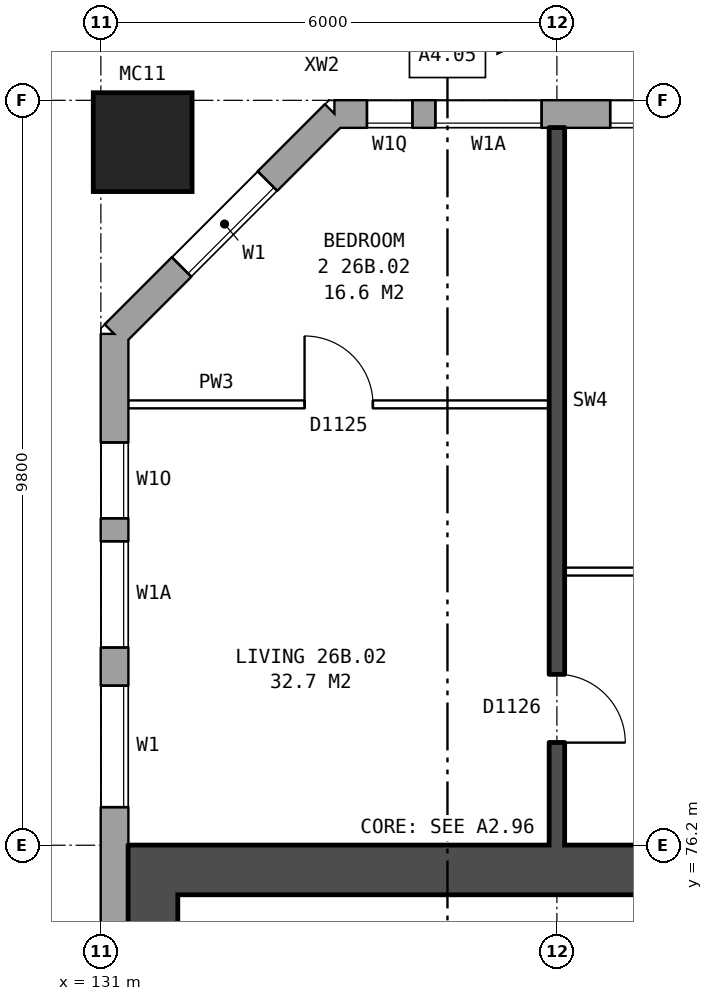
"""IFC4 building model, lengths in metres.
Left out: names, types, materials, properties, quantities, classifications, styles, units other than length and angle.
Written with IfcOpenShell. Run it as: python <this file> out.ifc"""

import sys

from ifc_helpers import new_model, si_unit, direction, frame, frame_2d, origin, origin_2d, place, context, subcontext, project, spatial, rectangle, hollow_rectangle, extrude, element, fill, save


model = new_model("IFC4")
c1 = context("Model", 3, precision=1e-05, world=origin(), true_north=direction((0.0, 1.0)))
c2 = subcontext(c1, "Body", "Model", "MODEL_VIEW")
j1 = project(units=[si_unit("LENGTHUNIT", "METRE"), si_unit("PLANEANGLEUNIT", "RADIAN")], contexts=[c1])
p1 = place(None, origin())
s1 = spatial("IfcSite", under=j1, at=p1, CompositionType="ELEMENT")
p2 = place(p1, origin())
s2 = spatial("IfcBuilding", under=s1, at=p2, CompositionType="ELEMENT")
p3 = place(p2, frame((0.0, 0.0, 96.4)))
s3 = spatial("IfcBuildingStorey", under=s2, at=p3, CompositionType="ELEMENT", Elevation=96.4)
p4 = place(p3, frame((131.55, 85.45, 0.0), z_axis=(0.0, 0.0, 1.0), x_axis=(1.0, 0.0, 0.0)))
e1 = element("IfcColumn", 1, at=p4, inside=s3, PredefinedType="COLUMN", context=c2, shape_type="SweptSolid", body=[
    extrude(hollow_rectangle(XDim=1.3, YDim=1.3, WallThickness=0.07, at=origin_2d()), origin(), (0.0, 0.0, 1.0), 3.1),
])
p5 = place(p3, frame((170.925, 85.82, 0.0), z_axis=(0.0, 0.0, 1.0), x_axis=(-1.0, 0.0, 0.0)))
e2 = element("IfcWall", 2, at=p5, inside=s3, PredefinedType="STANDARD", context=c2, shape_type="SweptSolid", body=[
    extrude(rectangle(XDim=36.851, YDim=0.36, at=frame_2d((18.425, 0.0))), origin(), (0.0, 0.0, 1.0), 2.85),
])
p6 = place(p5, frame((1.625, 0.0, 0.8)))
e3 = element("IfcOpeningElement", 3, at=p6, cuts=e2, PredefinedType="OPENING", context=c2, shape_type="SweptSolid", body=[
    extrude(rectangle(XDim=1.6, YDim=1.8, at=frame_2d((0.8, 0.9))), frame((0.0, 0.19, 0.0), z_axis=(0.0, -1.0, 0.0), x_axis=(1.0, 0.0, 0.0)), (0.0, 0.0, 1.0), 0.38),
])
p7 = place(p5, frame((4.625, 0.0, 0.8)))
e4 = element("IfcOpeningElement", 4, at=p7, cuts=e2, PredefinedType="OPENING", context=c2, shape_type="SweptSolid", body=[
    extrude(rectangle(XDim=1.6, YDim=1.8, at=frame_2d((0.8, 0.9))), frame((0.0, 0.19, 0.0), z_axis=(0.0, -1.0, 0.0), x_axis=(1.0, 0.0, 0.0)), (0.0, 0.0, 1.0), 0.38),
])
p8 = place(p5, frame((7.625, 0.0, 0.8)))
e5 = element("IfcOpeningElement", 5, at=p8, cuts=e2, PredefinedType="OPENING", context=c2, shape_type="SweptSolid", body=[
    extrude(rectangle(XDim=1.6, YDim=1.8, at=frame_2d((0.8, 0.9))), frame((0.0, 0.19, 0.0), z_axis=(0.0, -1.0, 0.0), x_axis=(1.0, 0.0, 0.0)), (0.0, 0.0, 1.0), 0.38),
])
p9 = place(p5, frame((10.625, 0.0, 0.8)))
e6 = element("IfcOpeningElement", 6, at=p9, cuts=e2, PredefinedType="OPENING", context=c2, shape_type="SweptSolid", body=[
    extrude(rectangle(XDim=1.6, YDim=1.8, at=frame_2d((0.8, 0.9))), frame((0.0, 0.19, 0.0), z_axis=(0.0, -1.0, 0.0), x_axis=(1.0, 0.0, 0.0)), (0.0, 0.0, 1.0), 0.38),
])
p10 = place(p5, frame((13.625, 0.0, 0.8)))
e7 = element("IfcOpeningElement", 7, at=p10, cuts=e2, PredefinedType="OPENING", context=c2, shape_type="SweptSolid", body=[
    extrude(rectangle(XDim=1.6, YDim=1.8, at=frame_2d((0.8, 0.9))), frame((0.0, 0.19, 0.0), z_axis=(0.0, -1.0, 0.0), x_axis=(1.0, 0.0, 0.0)), (0.0, 0.0, 1.0), 0.38),
])
p11 = place(p5, frame((16.625, 0.0, 0.8)))
e8 = element("IfcOpeningElement", 8, at=p11, cuts=e2, PredefinedType="OPENING", context=c2, shape_type="SweptSolid", body=[
    extrude(rectangle(XDim=1.6, YDim=1.8, at=frame_2d((0.8, 0.9))), frame((0.0, 0.19, 0.0), z_axis=(0.0, -1.0, 0.0), x_axis=(1.0, 0.0, 0.0)), (0.0, 0.0, 1.0), 0.38),
])
p12 = place(p5, frame((19.625, 0.0, 0.8)))
e9 = element("IfcOpeningElement", 9, at=p12, cuts=e2, PredefinedType="OPENING", context=c2, shape_type="SweptSolid", body=[
    extrude(rectangle(XDim=1.6, YDim=1.8, at=frame_2d((0.8, 0.9))), frame((0.0, 0.19, 0.0), z_axis=(0.0, -1.0, 0.0), x_axis=(1.0, 0.0, 0.0)), (0.0, 0.0, 1.0), 0.38),
])
p13 = place(p5, frame((22.625, 0.0, 0.8)))
e10 = element("IfcOpeningElement", 10, at=p13, cuts=e2, PredefinedType="OPENING", context=c2, shape_type="SweptSolid", body=[
    extrude(rectangle(XDim=1.6, YDim=1.8, at=frame_2d((0.8, 0.9))), frame((0.0, 0.19, 0.0), z_axis=(0.0, -1.0, 0.0), x_axis=(1.0, 0.0, 0.0)), (0.0, 0.0, 1.0), 0.38),
])
p14 = place(p5, frame((25.625, 0.0, 0.8)))
e11 = element("IfcOpeningElement", 11, at=p14, cuts=e2, PredefinedType="OPENING", context=c2, shape_type="SweptSolid", body=[
    extrude(rectangle(XDim=1.6, YDim=1.8, at=frame_2d((0.8, 0.9))), frame((0.0, 0.19, 0.0), z_axis=(0.0, -1.0, 0.0), x_axis=(1.0, 0.0, 0.0)), (0.0, 0.0, 1.0), 0.38),
])
p15 = place(p5, frame((28.625, 0.0, 0.8)))
e12 = element("IfcOpeningElement", 12, at=p15, cuts=e2, PredefinedType="OPENING", context=c2, shape_type="SweptSolid", body=[
    extrude(rectangle(XDim=1.6, YDim=1.8, at=frame_2d((0.8, 0.9))), frame((0.0, 0.19, 0.0), z_axis=(0.0, -1.0, 0.0), x_axis=(1.0, 0.0, 0.0)), (0.0, 0.0, 1.0), 0.38),
])
p16 = place(p5, frame((31.625, 0.0, 0.8)))
e13 = element("IfcOpeningElement", 13, at=p16, cuts=e2, PredefinedType="OPENING", context=c2, shape_type="SweptSolid", body=[
    extrude(rectangle(XDim=1.6, YDim=1.8, at=frame_2d((0.8, 0.9))), frame((0.0, 0.19, 0.0), z_axis=(0.0, -1.0, 0.0), x_axis=(1.0, 0.0, 0.0)), (0.0, 0.0, 1.0), 0.38),
])
p17 = place(p5, frame((34.125, 0.0, 0.8)))
e14 = element("IfcOpeningElement", 14, at=p17, cuts=e2, PredefinedType="OPENING", context=c2, shape_type="SweptSolid", body=[
    extrude(rectangle(XDim=1.4, YDim=1.8, at=frame_2d((0.7, 0.9))), frame((0.0, 0.19, 0.0), z_axis=(0.0, -1.0, 0.0), x_axis=(1.0, 0.0, 0.0)), (0.0, 0.0, 1.0), 0.38),
])
p18 = place(p5, frame((35.825, 0.0, 0.8)))
e15 = element("IfcOpeningElement", 15, at=p18, cuts=e2, PredefinedType="OPENING", context=c2, shape_type="SweptSolid", body=[
    extrude(rectangle(XDim=0.6, YDim=1.2, at=frame_2d((0.3, 0.6))), frame((0.0, 0.19, 0.0), z_axis=(0.0, -1.0, 0.0), x_axis=(1.0, 0.0, 0.0)), (0.0, 0.0, 1.0), 0.38),
])
p19 = place(p3, frame((134.075, 85.82, 0.0), z_axis=(0.0, 0.0, 1.0), x_axis=(-0.707106781187, -0.707106781187, 0.0)))
e16 = element("IfcWall", 16, at=p19, inside=s3, PredefinedType="STANDARD", context=c2, shape_type="SweptSolid", body=[
    extrude(rectangle(XDim=4.094, YDim=0.36, at=frame_2d((2.047, 0.0))), origin(), (0.0, 0.0, 1.0), 2.85),
])
p20 = place(p19, frame((1.247, 0.0, 0.8)))
e17 = element("IfcOpeningElement", 17, at=p20, cuts=e16, PredefinedType="OPENING", context=c2, shape_type="SweptSolid", body=[
    extrude(rectangle(XDim=1.6, YDim=1.8, at=frame_2d((0.8, 0.9))), frame((0.0, 0.19, 0.0), z_axis=(0.0, -1.0, 0.0), x_axis=(1.0, 0.0, 0.0)), (0.0, 0.0, 1.0), 0.38),
])
p21 = place(p3, frame((131.18, 82.925, 0.0), z_axis=(0.0, 0.0, 1.0), x_axis=(0.0, -1.0, 0.0)))
e18 = element("IfcWall", 18, at=p21, inside=s3, PredefinedType="STANDARD", context=c2, shape_type="SweptSolid", body=[
    extrude(rectangle(XDim=25.851, YDim=0.36, at=frame_2d((12.925, 0.0))), origin(), (0.0, 0.0, 1.0), 2.85),
])
p22 = place(p21, frame((1.425, 0.0, 0.8)))
e19 = element("IfcOpeningElement", 19, at=p22, cuts=e18, PredefinedType="OPENING", context=c2, shape_type="SweptSolid", body=[
    extrude(rectangle(XDim=1.0, YDim=1.2, at=frame_2d((0.5, 0.6))), frame((0.0, 0.19, 0.0), z_axis=(0.0, -1.0, 0.0), x_axis=(1.0, 0.0, 0.0)), (0.0, 0.0, 1.0), 0.38),
])
p23 = place(p21, frame((4.625, 0.0, 0.8)))
e20 = element("IfcOpeningElement", 20, at=p23, cuts=e18, PredefinedType="OPENING", context=c2, shape_type="SweptSolid", body=[
    extrude(rectangle(XDim=1.6, YDim=1.8, at=frame_2d((0.8, 0.9))), frame((0.0, 0.19, 0.0), z_axis=(0.0, -1.0, 0.0), x_axis=(1.0, 0.0, 0.0)), (0.0, 0.0, 1.0), 0.38),
])
p24 = place(p21, frame((19.625, 0.0, 0.8)))
e21 = element("IfcOpeningElement", 21, at=p24, cuts=e18, PredefinedType="OPENING", context=c2, shape_type="SweptSolid", body=[
    extrude(rectangle(XDim=1.6, YDim=1.8, at=frame_2d((0.8, 0.9))), frame((0.0, 0.19, 0.0), z_axis=(0.0, -1.0, 0.0), x_axis=(1.0, 0.0, 0.0)), (0.0, 0.0, 1.0), 0.38),
])
p25 = place(p21, frame((21.525, 0.0, 0.8)))
e22 = element("IfcOpeningElement", 22, at=p25, cuts=e18, PredefinedType="OPENING", context=c2, shape_type="SweptSolid", body=[
    extrude(rectangle(XDim=1.4, YDim=1.8, at=frame_2d((0.7, 0.9))), frame((0.0, 0.19, 0.0), z_axis=(0.0, -1.0, 0.0), x_axis=(1.0, 0.0, 0.0)), (0.0, 0.0, 1.0), 0.38),
])
p26 = place(p21, frame((2.725, 0.0, 0.8)))
e23 = element("IfcOpeningElement", 23, at=p26, cuts=e18, PredefinedType="OPENING", context=c2, shape_type="SweptSolid", body=[
    extrude(rectangle(XDim=1.4, YDim=1.8, at=frame_2d((0.7, 0.9))), frame((0.0, 0.19, 0.0), z_axis=(0.0, -1.0, 0.0), x_axis=(1.0, 0.0, 0.0)), (0.0, 0.0, 1.0), 0.38),
])
p27 = place(p21, frame((23.225, 0.0, 0.8)))
e24 = element("IfcOpeningElement", 24, at=p27, cuts=e18, PredefinedType="OPENING", context=c2, shape_type="SweptSolid", body=[
    extrude(rectangle(XDim=1.0, YDim=1.2, at=frame_2d((0.5, 0.6))), frame((0.0, 0.19, 0.0), z_axis=(0.0, -1.0, 0.0), x_axis=(1.0, 0.0, 0.0)), (0.0, 0.0, 1.0), 0.38),
])
p28 = place(p3, frame((131.685, 64.45, 0.0), z_axis=(0.0, 0.0, 1.0), x_axis=(0.0, 1.0, 0.0)))
e25 = element("IfcWall", 25, at=p28, inside=s3, PredefinedType="SHEAR", context=c2, shape_type="SweptSolid", body=[
    extrude(rectangle(XDim=11.1, YDim=0.65, at=frame_2d((5.55, 0.0))), origin(), (0.0, 0.0, 1.0), 2.85),
])
p29 = place(p3, frame((139.76, 75.875, 0.0), z_axis=(0.0, 0.0, 1.0), x_axis=(-1.0, 0.0, 0.0)))
e26 = element("IfcWall", 26, at=p29, inside=s3, PredefinedType="SHEAR", context=c2, shape_type="SweptSolid", body=[
    extrude(rectangle(XDim=8.4, YDim=0.65, at=frame_2d((4.2, 0.0))), origin(), (0.0, 0.0, 1.0), 2.85),
])
p30 = place(p3, frame((137.1, 79.8, 0.0), z_axis=(0.0, 0.0, 1.0), x_axis=(1.0, 0.0, 0.0)))
e27 = element("IfcWall", 27, at=p30, inside=s3, PredefinedType="PARTITIONING", context=c2, shape_type="SweptSolid", body=[
    extrude(rectangle(XDim=5.8, YDim=0.1, at=frame_2d((2.9, 0.0))), origin(), (0.0, 0.0, 1.0), 2.85),
])
p31 = place(p30, frame((1.3, 0.0, 0.0)))
e28 = element("IfcOpeningElement", 28, at=p31, cuts=e27, PredefinedType="OPENING", context=c2, shape_type="SweptSolid", body=[
    extrude(rectangle(XDim=0.9, YDim=2.1, at=frame_2d((0.45, 1.05))), frame((0.0, 0.06, 0.0), z_axis=(0.0, -1.0, 0.0), x_axis=(1.0, 0.0, 0.0)), (0.0, 0.0, 1.0), 0.12),
])
p32 = place(p30, frame((4.2, 0.0, 0.0)))
e29 = element("IfcOpeningElement", 29, at=p32, cuts=e27, PredefinedType="OPENING", context=c2, shape_type="SweptSolid", body=[
    extrude(rectangle(XDim=0.9, YDim=2.1, at=frame_2d((0.45, 1.05))), frame((0.0, 0.06, 0.0), z_axis=(0.0, -1.0, 0.0), x_axis=(1.0, 0.0, 0.0)), (0.0, 0.0, 1.0), 0.12),
])
p33 = place(p3, frame((131.36, 82.0, 0.0), z_axis=(0.0, 0.0, 1.0), x_axis=(1.0, 0.0, 0.0)))
e30 = element("IfcWall", 30, at=p33, inside=s3, PredefinedType="PARTITIONING", context=c2, shape_type="SweptSolid", body=[
    extrude(rectangle(XDim=5.54, YDim=0.1, at=frame_2d((2.77, 0.0))), origin(), (0.0, 0.0, 1.0), 2.85),
])
p34 = place(p33, frame((2.32, 0.0, 0.0)))
e31 = element("IfcOpeningElement", 31, at=p34, cuts=e30, PredefinedType="OPENING", context=c2, shape_type="SweptSolid", body=[
    extrude(rectangle(XDim=0.9, YDim=2.1, at=frame_2d((0.45, 1.05))), frame((0.0, 0.06, 0.0), z_axis=(0.0, -1.0, 0.0), x_axis=(1.0, 0.0, 0.0)), (0.0, 0.0, 1.0), 0.12),
])
p35 = place(p3, frame((137.0, 76.2, 0.0), z_axis=(0.0, 0.0, 1.0), x_axis=(0.0, 1.0, 0.0)))
e32 = element("IfcWall", 32, at=p35, inside=s3, PredefinedType="SOLIDWALL", context=c2, shape_type="SweptSolid", body=[
    extrude(rectangle(XDim=9.44, YDim=0.2, at=frame_2d((4.72, 0.0))), origin(), (0.0, 0.0, 1.0), 2.85),
])
p36 = place(p35, frame((1.35, 0.0, 0.0)))
e33 = element("IfcOpeningElement", 33, at=p36, cuts=e32, PredefinedType="OPENING", context=c2, shape_type="SweptSolid", body=[
    extrude(rectangle(XDim=0.9, YDim=2.1, at=frame_2d((0.45, 1.05))), frame((0.0, 0.11, 0.0), z_axis=(0.0, -1.0, 0.0), x_axis=(1.0, 0.0, 0.0)), (0.0, 0.0, 1.0), 0.22),
])
p37 = place(p16, origin())
e34 = element("IfcWindow", 34, at=p37, inside=s3, PartitioningType="SINGLE_PANEL", PredefinedType="WINDOW", context=c2, shape_type="SweptSolid", body=[
    extrude(rectangle(XDim=1.6, YDim=1.8, at=frame_2d((0.8, 0.9))), frame((0.0, 0.15, 0.0), z_axis=(0.0, -1.0, 0.0), x_axis=(1.0, 0.0, 0.0)), (0.0, 0.0, 1.0), 0.06),
])
fill(e13, e34)
p38 = place(p17, origin())
e35 = element("IfcWindow", 35, at=p38, inside=s3, PartitioningType="SINGLE_PANEL", PredefinedType="WINDOW", context=c2, shape_type="SweptSolid", body=[
    extrude(rectangle(XDim=1.4, YDim=1.8, at=frame_2d((0.7, 0.9))), frame((0.0, 0.15, 0.0), z_axis=(0.0, -1.0, 0.0), x_axis=(1.0, 0.0, 0.0)), (0.0, 0.0, 1.0), 0.06),
])
fill(e14, e35)
p39 = place(p20, origin())
e36 = element("IfcWindow", 36, at=p39, inside=s3, PartitioningType="SINGLE_PANEL", PredefinedType="WINDOW", context=c2, shape_type="SweptSolid", body=[
    extrude(rectangle(XDim=1.6, YDim=1.8, at=frame_2d((0.8, 0.9))), frame((0.0, 0.15, 0.0), z_axis=(0.0, -1.0, 0.0), x_axis=(1.0, 0.0, 0.0)), (0.0, 0.0, 1.0), 0.06),
])
fill(e17, e36)
p40 = place(p22, origin())
e37 = element("IfcWindow", 37, at=p40, inside=s3, PartitioningType="SINGLE_PANEL", PredefinedType="WINDOW", context=c2, shape_type="SweptSolid", body=[
    extrude(rectangle(XDim=1.0, YDim=1.2, at=frame_2d((0.5, 0.6))), frame((0.0, 0.15, 0.0), z_axis=(0.0, -1.0, 0.0), x_axis=(1.0, 0.0, 0.0)), (0.0, 0.0, 1.0), 0.06),
])
fill(e19, e37)
p41 = place(p23, origin())
e38 = element("IfcWindow", 38, at=p41, inside=s3, PartitioningType="SINGLE_PANEL", PredefinedType="WINDOW", context=c2, shape_type="SweptSolid", body=[
    extrude(rectangle(XDim=1.6, YDim=1.8, at=frame_2d((0.8, 0.9))), frame((0.0, 0.15, 0.0), z_axis=(0.0, -1.0, 0.0), x_axis=(1.0, 0.0, 0.0)), (0.0, 0.0, 1.0), 0.06),
])
fill(e20, e38)
p42 = place(p34, origin())
e39 = element("IfcDoor", 39, at=p42, inside=s3, OperationType="SINGLE_SWING_LEFT", PredefinedType="DOOR", context=c2, shape_type="SweptSolid", body=[
    extrude(rectangle(XDim=0.9, YDim=2.1, at=frame_2d((0.45, 1.05))), frame((0.0, 0.025, 0.0), z_axis=(0.0, -1.0, 0.0), x_axis=(1.0, 0.0, 0.0)), (0.0, 0.0, 1.0), 0.05),
])
fill(e31, e39)
p43 = place(p36, frame((0.9, 0.0, 0.0), z_axis=(0.0, 0.0, 1.0), x_axis=(-1.0, 0.0, 0.0)))
e40 = element("IfcDoor", 40, at=p43, inside=s3, OperationType="SINGLE_SWING_RIGHT", PredefinedType="DOOR", context=c2, shape_type="SweptSolid", body=[
    extrude(rectangle(XDim=0.9, YDim=2.1, at=frame_2d((0.45, 1.05))), frame((0.0, 0.025, 0.0), z_axis=(0.0, -1.0, 0.0), x_axis=(1.0, 0.0, 0.0)), (0.0, 0.0, 1.0), 0.05),
])
fill(e33, e40)
p44 = place(p18, origin())
e41 = element("IfcWindow", 41, at=p44, inside=s3, PartitioningType="SINGLE_PANEL", PredefinedType="WINDOW", context=c2, shape_type="SweptSolid", body=[
    extrude(rectangle(XDim=0.6, YDim=1.2, at=frame_2d((0.3, 0.6))), frame((0.0, 0.15, 0.0), z_axis=(0.0, -1.0, 0.0), x_axis=(1.0, 0.0, 0.0)), (0.0, 0.0, 1.0), 0.06),
])
fill(e15, e41)
p45 = place(p26, origin())
e42 = element("IfcWindow", 42, at=p45, inside=s3, PartitioningType="SINGLE_PANEL", PredefinedType="WINDOW", context=c2, shape_type="SweptSolid", body=[
    extrude(rectangle(XDim=1.4, YDim=1.8, at=frame_2d((0.7, 0.9))), frame((0.0, 0.15, 0.0), z_axis=(0.0, -1.0, 0.0), x_axis=(1.0, 0.0, 0.0)), (0.0, 0.0, 1.0), 0.06),
])
fill(e23, e42)
save(model, sys.argv[1])
